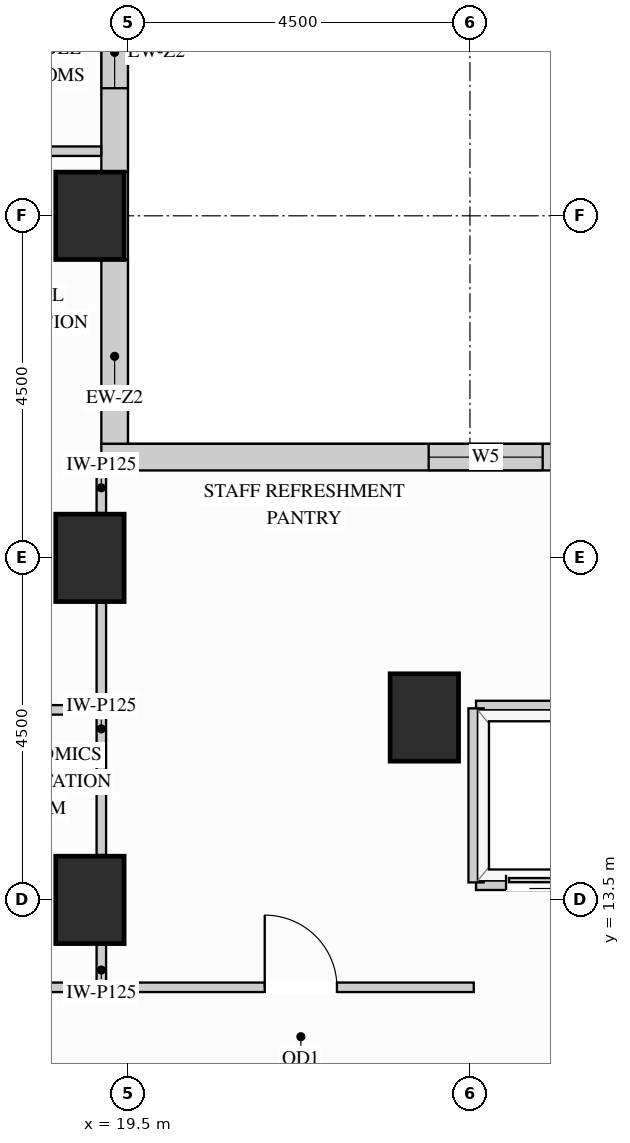
"""IFC4 building model, lengths in metres.
Left out: names, types, materials, properties, quantities, classifications, styles, units other than length and angle.
Written with IfcOpenShell. Run it as: python <this file> out.ifc"""

import sys

from ifc_helpers import new_model, si_unit, direction, frame, frame_2d, origin, origin_2d, place, context, subcontext, project, spatial, rectangle, extrude, source, transform, mapped, element, fill, save


model = new_model("IFC4")
c1 = context("Model", 3, precision=1e-05, world=origin(), true_north=direction((0.0, 1.0)))
c2 = subcontext(c1, "Body", "Model", "MODEL_VIEW")
j1 = project(units=[si_unit("LENGTHUNIT", "METRE"), si_unit("PLANEANGLEUNIT", "RADIAN")], contexts=[c1])
p1 = place(None, origin())
s1 = spatial("IfcSite", under=j1, at=p1, CompositionType="ELEMENT")
p2 = place(p1, origin())
s2 = spatial("IfcBuilding", under=s1, at=p2, CompositionType="ELEMENT")
p3 = place(p2, frame((0.0, 0.0, 117.0)))
s3 = spatial("IfcBuildingStorey", under=s2, at=p3, CompositionType="ELEMENT", Elevation=117.0)
m1 = source(origin(), c2, "Body", "SweptSolid", [
    extrude(rectangle(XDim=0.9, YDim=1.15, at=origin_2d()), origin(), (0.0, 0.0, 1.0), 3.38),
])
for number, where, z_axis, x_axis in (
    (1, (19.0, 13.5, 0.0), (0.0, 0.0, 1.0), (1.0, 0.0, 0.0)),
    (2, (19.0, 18.0, 0.0), (0.0, 0.0, 1.0), (1.0, 0.0, 0.0)),
    (3, (19.0, 22.5, 0.0), (0.0, 0.0, 1.0), (1.0, 0.0, 0.0)),
    (4, (23.4, 15.9, 0.0), (0.0, 0.0, 1.0), (1.0, 0.0, 0.0)),
):
    element("IfcColumn", number, at=place(p3, frame(where, z_axis=z_axis, x_axis=x_axis)), inside=s3, PredefinedType="COLUMN", context=c2, shape_type="MappedRepresentation", body=[
        mapped(m1, transform((0.0, 0.0, 0.0), x_axis=(1.0, 0.0, 0.0), y_axis=(0.0, 1.0, 0.0), z_axis=(0.0, 0.0, 1.0))),
    ])
m2 = source(origin(), c2, "Body", "SweptSolid", [
    extrude(rectangle(XDim=2.429, YDim=0.35, at=frame_2d((1.214, 0.0))), origin(), (0.0, 0.0, 1.0), 2.519),
])
p4 = place(p3, frame((19.325, 19.498, 0.0), z_axis=(0.0, 0.0, 1.0), x_axis=(0.0, 1.0, 0.0)))
e5 = element("IfcWall", 5, at=p4, inside=s3, PredefinedType="SOLIDWALL", context=c2, shape_type="MappedRepresentation", body=[
    mapped(m2, transform((0.0, 0.0, 0.0), x_axis=(1.0, 0.0, 0.0), y_axis=(0.0, 1.0, 0.0), z_axis=(0.0, 0.0, 1.0))),
])
p5 = place(p3, frame((19.325, 23.073, 0.0), z_axis=(0.0, 0.0, 1.0), x_axis=(0.0, 1.0, 0.0)))
e6 = element("IfcWall", 6, at=p5, inside=s3, PredefinedType="SOLIDWALL", context=c2, shape_type="SweptSolid", body=[
    extrude(rectangle(XDim=3.154, YDim=0.35, at=frame_2d((1.577, 0.0))), origin(), (0.0, 0.0, 1.0), 2.519),
])
p6 = place(p5, frame((1.105, 0.0, 0.78)))
e7 = element("IfcOpeningElement", 7, at=p6, cuts=e6, PredefinedType="OPENING", context=c2, shape_type="SweptSolid", body=[
    extrude(rectangle(XDim=1.5, YDim=1.559, at=frame_2d((0.75, 0.78))), frame((0.0, 0.185, 0.0), z_axis=(0.0, -1.0, 0.0), x_axis=(1.0, 0.0, 0.0)), (0.0, 0.0, 1.0), 0.37),
])
p7 = place(p3, frame((34.75, 19.325, 0.0), z_axis=(0.0, 0.0, 1.0), x_axis=(-1.0, 0.0, 0.0)))
e8 = element("IfcWall", 8, at=p7, inside=s3, PredefinedType="SOLIDWALL", context=c2, shape_type="SweptSolid", body=[
    extrude(rectangle(XDim=15.6, YDim=0.35, at=frame_2d((7.8, 0.0))), origin(), (0.0, 0.0, 1.0), 3.365),
])
p8 = place(p7, frame((4.307, 0.0, 0.78)))
e9 = element("IfcOpeningElement", 9, at=p8, cuts=e8, PredefinedType="OPENING", context=c2, shape_type="SweptSolid", body=[
    extrude(rectangle(XDim=1.5, YDim=2.0, at=frame_2d((0.75, 1.0))), frame((0.0, 0.185, 0.0), z_axis=(0.0, -1.0, 0.0), x_axis=(1.0, 0.0, 0.0)), (0.0, 0.0, 1.0), 0.37),
])
p9 = place(p7, frame((9.793, 0.0, 0.78)))
e10 = element("IfcOpeningElement", 10, at=p9, cuts=e8, PredefinedType="OPENING", context=c2, shape_type="SweptSolid", body=[
    extrude(rectangle(XDim=1.5, YDim=2.0, at=frame_2d((0.75, 1.0))), frame((0.0, 0.185, 0.0), z_axis=(0.0, -1.0, 0.0), x_axis=(1.0, 0.0, 0.0)), (0.0, 0.0, 1.0), 0.37),
])
m3 = source(origin(), c2, "Body", "SweptSolid", [
    extrude(rectangle(XDim=2.6, YDim=0.125, at=frame_2d((1.3, 0.0))), origin(), (0.0, 0.0, 1.0), 3.365),
])
p10 = place(p3, frame((16.55, 16.0, 0.0), z_axis=(0.0, 0.0, 1.0), x_axis=(1.0, 0.0, 0.0)))
e11 = element("IfcWall", 11, at=p10, inside=s3, PredefinedType="PARTITIONING", context=c2, shape_type="MappedRepresentation", body=[
    mapped(m3, transform((0.0, 0.0, 0.0), x_axis=(1.0, 0.0, 0.0), y_axis=(0.0, 1.0, 0.0), z_axis=(0.0, 0.0, 1.0))),
])
m4 = source(origin(), c2, "Body", "SweptSolid", [
    extrude(rectangle(XDim=2.598, YDim=0.125, at=frame_2d((1.299, 0.0))), origin(), (0.0, 0.0, 1.0), 3.365),
])
p11 = place(p3, frame((16.55, 23.35, 0.0), z_axis=(0.0, 0.0, 1.0), x_axis=(1.0, 0.0, 0.0)))
e12 = element("IfcWall", 12, at=p11, inside=s3, PredefinedType="PARTITIONING", context=c2, shape_type="MappedRepresentation", body=[
    mapped(m4, transform((0.0, 0.0, 0.0), x_axis=(1.0, 0.0, 0.0), y_axis=(0.0, 1.0, 0.0), z_axis=(0.0, 0.0, 1.0))),
])
m5 = source(origin(), c2, "Body", "SweptSolid", [
    extrude(rectangle(XDim=0.56, YDim=0.125, at=frame_2d((0.28, 0.0))), origin(), (0.0, 0.0, 1.0), 2.677),
])
p12 = place(p3, frame((19.15, 12.35, 0.0), z_axis=(0.0, 0.0, 1.0), x_axis=(0.0, 1.0, 0.0)))
e13 = element("IfcWall", 13, at=p12, inside=s3, PredefinedType="PARTITIONING", context=c2, shape_type="MappedRepresentation", body=[
    mapped(m5, transform((0.0, 0.0, 0.0), x_axis=(1.0, 0.0, 0.0), y_axis=(0.0, 1.0, 0.0), z_axis=(0.0, 0.0, 1.0))),
])
m6 = source(origin(), c2, "Body", "SweptSolid", [
    extrude(rectangle(XDim=3.32, YDim=0.125, at=frame_2d((1.66, 0.0))), origin(), (0.0, 0.0, 1.0), 2.677),
])
p13 = place(p3, frame((19.15, 14.09, 0.0), z_axis=(0.0, 0.0, 1.0), x_axis=(0.0, 1.0, 0.0)))
e14 = element("IfcWall", 14, at=p13, inside=s3, PredefinedType="PARTITIONING", context=c2, shape_type="MappedRepresentation", body=[
    mapped(m6, transform((0.0, 0.0, 0.0), x_axis=(1.0, 0.0, 0.0), y_axis=(0.0, 1.0, 0.0), z_axis=(0.0, 0.0, 1.0))),
])
m7 = source(origin(), c2, "Body", "SweptSolid", [
    extrude(rectangle(XDim=0.558, YDim=0.125, at=frame_2d((0.279, 0.0))), origin(), (0.0, 0.0, 1.0), 2.519),
])
p14 = place(p3, frame((19.15, 18.59, 0.0), z_axis=(0.0, 0.0, 1.0), x_axis=(0.0, 1.0, 0.0)))
e15 = element("IfcWall", 15, at=p14, inside=s3, PredefinedType="PARTITIONING", context=c2, shape_type="MappedRepresentation", body=[
    mapped(m7, transform((0.0, 0.0, 0.0), x_axis=(1.0, 0.0, 0.0), y_axis=(0.0, 1.0, 0.0), z_axis=(0.0, 0.0, 1.0))),
])
m8 = source(origin(), c2, "Body", "SweptSolid", [
    extrude(rectangle(XDim=2.95, YDim=0.125, at=frame_2d((1.475, 0.0))), origin(), (0.0, 0.0, 1.0), 3.365),
])
p15 = place(p3, frame((16.55, 12.35, 0.0), z_axis=(0.0, 0.0, 1.0), x_axis=(1.0, 0.0, 0.0)))
e16 = element("IfcWall", 16, at=p15, inside=s3, PredefinedType="PARTITIONING", context=c2, shape_type="MappedRepresentation", body=[
    mapped(m8, transform((0.0, 0.0, 0.0), x_axis=(1.0, 0.0, 0.0), y_axis=(0.0, 1.0, 0.0), z_axis=(0.0, 0.0, 1.0))),
])
p16 = place(p3, frame((19.5, 12.35, 0.0), z_axis=(0.0, 0.0, 1.0), x_axis=(1.0, 0.0, 0.0)))
e17 = element("IfcWall", 17, at=p16, inside=s3, PredefinedType="PARTITIONING", context=c2, shape_type="SweptSolid", body=[
    extrude(rectangle(XDim=4.55, YDim=0.125, at=frame_2d((2.275, 0.0))), origin(), (0.0, 0.0, 1.0), 3.365),
])
p17 = place(p16, frame((1.8, 0.0, 0.0)))
e18 = element("IfcOpeningElement", 18, at=p17, cuts=e17, PredefinedType="OPENING", context=c2, shape_type="SweptSolid", body=[
    extrude(rectangle(XDim=0.95, YDim=2.15, at=frame_2d((0.475, 1.075))), frame((0.0, 0.073, 0.0), z_axis=(0.0, -1.0, 0.0), x_axis=(1.0, 0.0, 0.0)), (0.0, 0.0, 1.0), 0.145),
])
m9 = source(origin(), c2, "Body", "SweptSolid", [
    extrude(rectangle(XDim=1.89, YDim=0.2, at=frame_2d((0.945, 0.0))), origin(), (0.0, 0.0, 1.0), 2.677),
])
p18 = place(p3, frame((24.08, 16.02, 0.0), z_axis=(0.0, 0.0, 1.0), x_axis=(1.0, 0.0, 0.0)))
e19 = element("IfcWall", 19, at=p18, inside=s3, PredefinedType="PARTITIONING", context=c2, shape_type="MappedRepresentation", body=[
    mapped(m9, transform((0.0, 0.0, 0.0), x_axis=(1.0, 0.0, 0.0), y_axis=(0.0, 1.0, 0.0), z_axis=(0.0, 0.0, 1.0))),
])
p19 = place(p3, frame((24.08, 13.73, 0.0), z_axis=(0.0, 0.0, 1.0), x_axis=(1.0, 0.0, 0.0)))
e20 = element("IfcWall", 20, at=p19, inside=s3, PredefinedType="PARTITIONING", context=c2, shape_type="SweptSolid", body=[
    extrude(rectangle(XDim=1.89, YDim=0.2, at=frame_2d((0.945, 0.0))), origin(), (0.0, 0.0, 1.0), 2.446),
])
p20 = place(p19, frame((0.395, 0.0, 0.0)))
e21 = element("IfcOpeningElement", 21, at=p20, cuts=e20, PredefinedType="OPENING", context=c2, shape_type="SweptSolid", body=[
    extrude(rectangle(XDim=1.1, YDim=2.2, at=frame_2d((0.55, 1.1))), frame((0.0, 0.11, 0.0), z_axis=(0.0, -1.0, 0.0), x_axis=(1.0, 0.0, 0.0)), (0.0, 0.0, 1.0), 0.22),
])
m10 = source(origin(), c2, "Body", "SweptSolid", [
    extrude(rectangle(XDim=2.29, YDim=0.2, at=frame_2d((1.145, 0.0))), origin(), (0.0, 0.0, 1.0), 3.365),
])
p21 = place(p3, frame((24.08, 13.73, 0.0), z_axis=(0.0, 0.0, 1.0), x_axis=(0.0, 1.0, 0.0)))
e22 = element("IfcWall", 22, at=p21, inside=s3, PredefinedType="PARTITIONING", context=c2, shape_type="MappedRepresentation", body=[
    mapped(m10, transform((0.0, 0.0, 0.0), x_axis=(1.0, 0.0, 0.0), y_axis=(0.0, 1.0, 0.0), z_axis=(0.0, 0.0, 1.0))),
])
m11 = source(origin(), c2, "Body", "SweptSolid", [
    extrude(rectangle(XDim=1.1, YDim=2.2, at=frame_2d((0.55, 1.1))), frame((0.0, 0.025, 0.0), z_axis=(0.0, -1.0, 0.0), x_axis=(1.0, 0.0, 0.0)), (0.0, 0.0, 1.0), 0.05),
])
p22 = place(p20, origin())
e23 = element("IfcDoor", 23, at=p22, inside=s3, OperationType="SLIDING_TO_LEFT", PredefinedType="DOOR", context=c2, shape_type="MappedRepresentation", body=[
    mapped(m11, transform((0.0, 0.0, 0.0), x_axis=(1.0, 0.0, 0.0), y_axis=(0.0, 1.0, 0.0), z_axis=(0.0, 0.0, 1.0))),
])
fill(e21, e23)
m12 = source(origin(), c2, "Body", "SweptSolid", [
    extrude(rectangle(XDim=0.95, YDim=2.15, at=frame_2d((0.475, 1.075))), frame((0.0, 0.025, 0.0), z_axis=(0.0, -1.0, 0.0), x_axis=(1.0, 0.0, 0.0)), (0.0, 0.0, 1.0), 0.05),
])
p23 = place(p17, origin())
e24 = element("IfcDoor", 24, at=p23, inside=s3, OperationType="SINGLE_SWING_LEFT", PredefinedType="DOOR", context=c2, shape_type="MappedRepresentation", body=[
    mapped(m12, transform((0.0, 0.0, 0.0), x_axis=(1.0, 0.0, 0.0), y_axis=(0.0, 1.0, 0.0), z_axis=(0.0, 0.0, 1.0))),
])
fill(e18, e24)
m13 = source(origin(), c2, "Body", "SweptSolid", [
    extrude(rectangle(XDim=1.5, YDim=1.559, at=frame_2d((0.75, 0.78))), frame((0.0, 0.03, 0.0), z_axis=(0.0, -1.0, 0.0), x_axis=(1.0, 0.0, 0.0)), (0.0, 0.0, 1.0), 0.06),
])
p24 = place(p6, origin())
e25 = element("IfcWindow", 25, at=p24, inside=s3, PartitioningType="SINGLE_PANEL", PredefinedType="WINDOW", context=c2, shape_type="MappedRepresentation", body=[
    mapped(m13, transform((0.0, 0.0, 0.0), x_axis=(1.0, 0.0, 0.0), y_axis=(0.0, 1.0, 0.0), z_axis=(0.0, 0.0, 1.0))),
])
fill(e7, e25)
m14 = source(origin(), c2, "Body", "SweptSolid", [
    extrude(rectangle(XDim=1.5, YDim=2.0, at=frame_2d((0.75, 1.0))), frame((0.0, 0.03, 0.0), z_axis=(0.0, -1.0, 0.0), x_axis=(1.0, 0.0, 0.0)), (0.0, 0.0, 1.0), 0.06),
])
p25 = place(p9, origin())
e26 = element("IfcWindow", 26, at=p25, inside=s3, PartitioningType="SINGLE_PANEL", PredefinedType="WINDOW", context=c2, shape_type="MappedRepresentation", body=[
    mapped(m14, transform((0.0, 0.0, 0.0), x_axis=(1.0, 0.0, 0.0), y_axis=(0.0, 1.0, 0.0), z_axis=(0.0, 0.0, 1.0))),
])
fill(e10, e26)
save(model, sys.argv[1])
